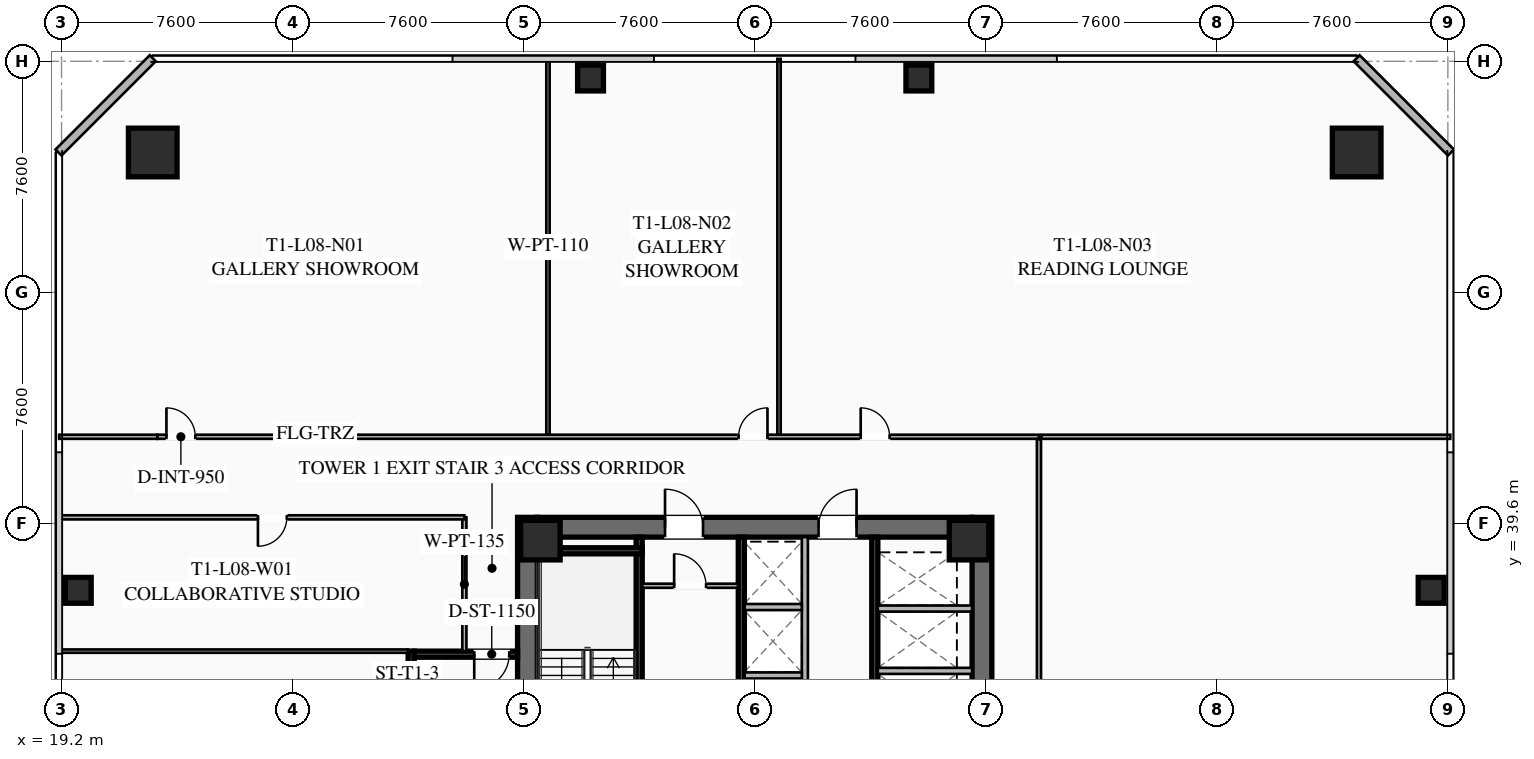
"""IFC4 building model, lengths in metres.
Left out: names, types, materials, properties, quantities, classifications, styles, units other than length and angle.
Written with IfcOpenShell. Run it as: python <this file> out.ifc"""

import sys

from ifc_helpers import new_model, si_unit, direction, frame, frame_2d, origin, origin_2d, place, context, subcontext, project, spatial, rectangle, hollow_rectangle, extrude, element, fill, save


model = new_model("IFC4")
c1 = context("Model", 3, precision=1e-05, world=origin(), true_north=direction((0.0, 1.0)))
c2 = subcontext(c1, "Body", "Model", "MODEL_VIEW")
j1 = project(units=[si_unit("LENGTHUNIT", "METRE"), si_unit("PLANEANGLEUNIT", "RADIAN")], contexts=[c1])
p1 = place(None, origin())
s1 = spatial("IfcSite", under=j1, at=p1, CompositionType="ELEMENT")
p2 = place(p1, origin())
s2 = spatial("IfcBuilding", under=s1, at=p2, CompositionType="ELEMENT")
p3 = place(p2, frame((0.0, 0.0, 35.25)))
s3 = spatial("IfcBuildingStorey", under=s2, at=p3, CompositionType="ELEMENT", Elevation=35.25)
for number, where, z_axis, x_axis in (
    (1, (34.525, 24.2, 0.0), (0.0, 0.0, 1.0), (0.0, 1.0, 0.0)),
    (2, (49.475, 39.8, 0.0), (0.0, 0.0, 1.0), (0.0, -1.0, 0.0)),
):
    element("IfcWall", number, at=place(p3, frame(where, z_axis=z_axis, x_axis=x_axis)), inside=s3, PredefinedType="SHEAR", context=c2, shape_type="SweptSolid", body=[
        extrude(rectangle(XDim=15.6, YDim=0.65, at=frame_2d((7.8, 0.0))), origin(), (0.0, 0.0, 1.0), 3.55),
    ])
p4 = place(p3, frame((34.85, 39.475, 0.0), z_axis=(0.0, 0.0, 1.0), x_axis=(1.0, 0.0, 0.0)))
e3 = element("IfcWall", 3, at=p4, inside=s3, PredefinedType="SHEAR", context=c2, shape_type="SweptSolid", body=[
    extrude(rectangle(XDim=14.3, YDim=0.65, at=frame_2d((7.15, 0.0))), origin(), (0.0, 0.0, 1.0), 3.55),
])
p5 = place(p4, frame((4.2, 0.0, 0.0)))
e4 = element("IfcOpeningElement", 4, at=p5, cuts=e3, PredefinedType="OPENING", context=c2, shape_type="SweptSolid", body=[
    extrude(rectangle(XDim=1.25, YDim=2.25, at=frame_2d((0.625, 1.125))), frame((0.0, 0.335, 0.0), z_axis=(0.0, -1.0, 0.0), x_axis=(1.0, 0.0, 0.0)), (0.0, 0.0, 1.0), 0.67),
])
p6 = place(p4, frame((9.25, 0.0, 0.0)))
e5 = element("IfcOpeningElement", 5, at=p6, cuts=e3, PredefinedType="OPENING", context=c2, shape_type="SweptSolid", body=[
    extrude(rectangle(XDim=1.25, YDim=2.25, at=frame_2d((0.625, 1.125))), frame((0.0, 0.335, 0.0), z_axis=(0.0, -1.0, 0.0), x_axis=(1.0, 0.0, 0.0)), (0.0, 0.0, 1.0), 0.67),
])
for number, where, z_axis, x_axis in (
    (6, (49.05, 39.05, 0.0), (0.0, 0.0, 1.0), (1.0, 0.0, 0.0)),
    (7, (34.95, 39.05, 0.0), (0.0, 0.0, 1.0), (1.0, 0.0, 0.0)),
):
    element("IfcColumn", number, at=place(p3, frame(where, z_axis=z_axis, x_axis=x_axis)), inside=s3, PredefinedType="COLUMN", context=c2, shape_type="SweptSolid", body=[
        extrude(hollow_rectangle(XDim=1.3, YDim=1.3, WallThickness=0.05, at=origin_2d()), origin(), (0.0, 0.0, 1.0), 3.35),
    ])
for number, where, z_axis, x_axis in (
    (8, (61.8, 51.8, 0.0), (0.0, 0.0, 1.0), (1.0, 0.0, 0.0)),
    (9, (22.2, 51.8, 0.0), (0.0, 0.0, 1.0), (1.0, 0.0, 0.0)),
):
    element("IfcColumn", number, at=place(p3, frame(where, z_axis=z_axis, x_axis=x_axis)), inside=s3, PredefinedType="COLUMN", context=c2, shape_type="SweptSolid", body=[
        extrude(hollow_rectangle(XDim=1.6, YDim=1.6, WallThickness=0.06, at=origin_2d()), origin(), (0.0, 0.0, 1.0), 3.35),
    ])
for number, where, z_axis, x_axis in (
    (10, (64.25, 37.4, 0.0), (0.0, 0.0, 1.0), (1.0, 0.0, 0.0)),
    (11, (47.4, 54.25, 0.0), (0.0, 0.0, 1.0), (1.0, 0.0, 0.0)),
    (12, (36.6, 54.25, 0.0), (0.0, 0.0, 1.0), (1.0, 0.0, 0.0)),
    (13, (19.75, 37.4, 0.0), (0.0, 0.0, 1.0), (1.0, 0.0, 0.0)),
):
    element("IfcColumn", number, at=place(p3, frame(where, z_axis=z_axis, x_axis=x_axis)), inside=s3, PredefinedType="COLUMN", context=c2, shape_type="SweptSolid", body=[
        extrude(hollow_rectangle(XDim=0.85, YDim=0.85, WallThickness=0.035, at=origin_2d()), origin(), (0.0, 0.0, 1.0), 3.35),
    ])
for number, where, z_axis, x_axis in (
    (14, (19.1, 51.8, 0.0), (0.0, 0.0, 1.0), (0.707, 0.707, 0.0)),
    (15, (61.8, 54.9, 0.0), (0.0, 0.0, 1.0), (0.707, -0.707, 0.0)),
):
    element("IfcWall", number, at=place(p3, frame(where, z_axis=z_axis, x_axis=x_axis)), inside=s3, PredefinedType="SOLIDWALL", context=c2, shape_type="SweptSolid", body=[
        extrude(rectangle(XDim=4.384, YDim=0.28, at=frame_2d((2.192, 0.0))), origin(), (0.0, 0.0, 1.0), 3.35),
    ])
p7 = place(p3, frame((38.2, 31.2, 0.0), z_axis=(0.0, 0.0, 1.0), x_axis=(0.0, 1.0, 0.0)))
e16 = element("IfcWall", 16, at=p7, inside=s3, PredefinedType="SHEAR", context=c2, shape_type="SweptSolid", body=[
    extrude(rectangle(XDim=7.95, YDim=0.2, at=frame_2d((3.975, 0.0))), origin(), (0.0, 0.0, 1.0), 3.35),
])
p8 = place(p7, frame((0.45, 0.0, 0.0)))
e17 = element("IfcOpeningElement", 17, at=p8, cuts=e16, PredefinedType="OPENING", context=c2, shape_type="SweptSolid", body=[
    extrude(rectangle(XDim=1.15, YDim=2.2, at=frame_2d((0.575, 1.1))), frame((0.0, 0.11, 0.0), z_axis=(0.0, -1.0, 0.0), x_axis=(1.0, 0.0, 0.0)), (0.0, 0.0, 1.0), 0.22),
])
p9 = place(p3, frame((34.85, 38.7, 0.0), z_axis=(0.0, 0.0, 1.0), x_axis=(1.0, 0.0, 0.0)))
e18 = element("IfcWall", 18, at=p9, inside=s3, PredefinedType="SHEAR", context=c2, shape_type="SweptSolid", body=[
    extrude(rectangle(XDim=3.45, YDim=0.2, at=frame_2d((1.725, 0.0))), origin(), (0.0, 0.0, 1.0), 3.35),
])
p10 = place(p3, frame((41.56, 24.85, 0.0), z_axis=(0.0, 0.0, 1.0), x_axis=(0.0, 1.0, 0.0)))
e19 = element("IfcWall", 19, at=p10, inside=s3, PredefinedType="SHEAR", context=c2, shape_type="SweptSolid", body=[
    extrude(rectangle(XDim=14.3, YDim=0.2, at=frame_2d((7.15, 0.0))), origin(), (0.0, 0.0, 1.0), 3.35),
])
p11 = place(p3, frame((45.95, 39.15, 0.0), z_axis=(0.0, 0.0, 1.0), x_axis=(0.0, -1.0, 0.0)))
e20 = element("IfcWall", 20, at=p11, inside=s3, PredefinedType="SHEAR", context=c2, shape_type="SweptSolid", body=[
    extrude(rectangle(XDim=6.35, YDim=0.2, at=frame_2d((3.175, 0.0))), origin(), (0.0, 0.0, 1.0), 3.35),
])
for number, where, z_axis, x_axis in (
    (21, (46.05, 34.75, 0.0), (0.0, 0.0, 1.0), (1.0, 0.0, 0.0)),
    (22, (46.05, 36.8, 0.0), (0.0, 0.0, 1.0), (1.0, 0.0, 0.0)),
):
    element("IfcWall", number, at=place(p3, frame(where, z_axis=z_axis, x_axis=x_axis)), inside=s3, PredefinedType="SOLIDWALL", context=c2, shape_type="SweptSolid", body=[
        extrude(rectangle(XDim=3.1, YDim=0.2, at=frame_2d((1.55, 0.0))), origin(), (0.0, 0.0, 1.0), 3.35),
    ])
p12 = place(p3, frame((38.3, 37.55, 0.0), z_axis=(0.0, 0.0, 1.0), x_axis=(1.0, 0.0, 0.0)))
e23 = element("IfcWall", 23, at=p12, inside=s3, PredefinedType="PARTITIONING", context=c2, shape_type="SweptSolid", body=[
    extrude(rectangle(XDim=3.15, YDim=0.135, at=frame_2d((1.575, 0.0))), origin(), (0.0, 0.0, 1.0), 2.703),
])
p13 = place(p12, frame((1.05, 0.0, 0.0)))
e24 = element("IfcOpeningElement", 24, at=p13, cuts=e23, PredefinedType="OPENING", context=c2, shape_type="SweptSolid", body=[
    extrude(rectangle(XDim=1.05, YDim=2.2, at=frame_2d((0.525, 1.1))), frame((0.0, 0.077, 0.0), z_axis=(0.0, -1.0, 0.0), x_axis=(1.0, 0.0, 0.0)), (0.0, 0.0, 1.0), 0.155),
])
p14 = place(p3, frame((43.65, 32.35, 0.0), z_axis=(0.0, 0.0, 1.0), x_axis=(0.0, 1.0, 0.0)))
e25 = element("IfcWall", 25, at=p14, inside=s3, PredefinedType="SOLIDWALL", context=c2, shape_type="SweptSolid", body=[
    extrude(rectangle(XDim=6.8, YDim=0.2, at=frame_2d((3.4, 0.0))), origin(), (0.0, 0.0, 1.0), 3.35),
])
for number, where, z_axis, x_axis in (
    (26, (41.67, 34.6, 0.0), (0.0, 0.0, 1.0), (1.0, 0.0, 0.0)),
    (27, (41.67, 36.85, 0.0), (0.0, 0.0, 1.0), (1.0, 0.0, 0.0)),
):
    element("IfcWall", number, at=place(p3, frame(where, z_axis=z_axis, x_axis=x_axis)), inside=s3, PredefinedType="SOLIDWALL", context=c2, shape_type="SweptSolid", body=[
        extrude(rectangle(XDim=1.88, YDim=0.2, at=frame_2d((0.94, 0.0))), origin(), (0.0, 0.0, 1.0), 3.35),
    ])
p15 = place(p3, frame((30.7, 28.6, 0.0), z_axis=(0.0, 0.0, 1.0), x_axis=(0.0, 1.0, 0.0)))
e28 = element("IfcWall", 28, at=p15, inside=s3, PredefinedType="SHEAR", context=c2, shape_type="SweptSolid", body=[
    extrude(rectangle(XDim=6.8, YDim=0.2, at=frame_2d((3.4, 0.0))), origin(), (0.0, 0.0, 1.0), 3.35),
])
p16 = place(p3, frame((34.2, 35.3, 0.0), z_axis=(0.0, 0.0, 1.0), x_axis=(-1.0, 0.0, 0.0)))
e29 = element("IfcWall", 29, at=p16, inside=s3, PredefinedType="SHEAR", context=c2, shape_type="SweptSolid", body=[
    extrude(rectangle(XDim=3.4, YDim=0.2, at=frame_2d((1.7, 0.0))), origin(), (0.0, 0.0, 1.0), 3.35),
])
p17 = place(p16, frame((0.275, 0.0, 0.0)))
e30 = element("IfcOpeningElement", 30, at=p17, cuts=e29, PredefinedType="OPENING", context=c2, shape_type="SweptSolid", body=[
    extrude(rectangle(XDim=1.15, YDim=2.2, at=frame_2d((0.575, 1.1))), frame((0.0, 0.11, 0.0), z_axis=(0.0, -1.0, 0.0), x_axis=(1.0, 0.0, 0.0)), (0.0, 0.0, 1.0), 0.22),
])
p18 = place(p3, frame((32.45, 35.4, 0.0), z_axis=(0.0, 0.0, 1.0), x_axis=(0.0, 1.0, 0.0)))
e31 = element("IfcWall", 31, at=p18, inside=s3, PredefinedType="PARTITIONING", context=c2, shape_type="SweptSolid", body=[
    extrude(rectangle(XDim=4.4, YDim=0.135, at=frame_2d((2.2, 0.0))), origin(), (0.0, 0.0, 1.0), 2.703),
])
p19 = place(p3, frame((22.35, 42.45, 0.0), z_axis=(0.0, 0.0, 1.0), x_axis=(1.0, 0.0, 0.0)))
e32 = element("IfcWall", 32, at=p19, inside=s3, PredefinedType="PARTITIONING", context=c2, shape_type="SweptSolid", body=[
    extrude(rectangle(XDim=29.0, YDim=0.135, at=frame_2d((14.5, 0.0))), origin(), (0.0, 0.0, 1.0), 2.703),
])
p20 = place(p19, frame((0.3, 0.0, 0.0)))
e33 = element("IfcOpeningElement", 33, at=p20, cuts=e32, PredefinedType="OPENING", context=c2, shape_type="SweptSolid", body=[
    extrude(rectangle(XDim=0.95, YDim=2.05, at=frame_2d((0.475, 1.025))), frame((0.0, 0.077, 0.0), z_axis=(0.0, -1.0, 0.0), x_axis=(1.0, 0.0, 0.0)), (0.0, 0.0, 1.0), 0.155),
])
p21 = place(p19, frame((19.12, 0.0, 0.0)))
e34 = element("IfcOpeningElement", 34, at=p21, cuts=e32, PredefinedType="OPENING", context=c2, shape_type="SweptSolid", body=[
    extrude(rectangle(XDim=0.95, YDim=2.05, at=frame_2d((0.475, 1.025))), frame((0.0, 0.077, 0.0), z_axis=(0.0, -1.0, 0.0), x_axis=(1.0, 0.0, 0.0)), (0.0, 0.0, 1.0), 0.155),
])
p22 = place(p19, frame((23.137, 0.0, 0.0)))
e35 = element("IfcOpeningElement", 35, at=p22, cuts=e32, PredefinedType="OPENING", context=c2, shape_type="SweptSolid", body=[
    extrude(rectangle(XDim=0.95, YDim=2.05, at=frame_2d((0.475, 1.025))), frame((0.0, 0.077, 0.0), z_axis=(0.0, -1.0, 0.0), x_axis=(1.0, 0.0, 0.0)), (0.0, 0.0, 1.0), 0.155),
])
p23 = place(p3, frame((19.12, 42.45, 0.0), z_axis=(0.0, 0.0, 1.0), x_axis=(1.0, 0.0, 0.0)))
e36 = element("IfcWall", 36, at=p23, inside=s3, PredefinedType="PARTITIONING", context=c2, shape_type="SweptSolid", body=[
    extrude(rectangle(XDim=3.23, YDim=0.135, at=frame_2d((1.615, 0.0))), origin(), (0.0, 0.0, 1.0), 2.703),
])
for number, where, z_axis, x_axis in (
    (37, (35.2, 42.53, 0.0), (0.0, 0.0, 1.0), (0.0, 1.0, 0.0)),
    (38, (42.8, 42.53, 0.0), (0.0, 0.0, 1.0), (0.0, 1.0, 0.0)),
):
    element("IfcWall", number, at=place(p3, frame(where, z_axis=z_axis, x_axis=x_axis)), inside=s3, PredefinedType="PARTITIONING", context=c2, shape_type="SweptSolid", body=[
        extrude(rectangle(XDim=12.35, YDim=0.11, at=frame_2d((6.175, 0.0))), origin(), (0.0, 0.0, 1.0), 2.703),
    ])
p24 = place(p3, frame((51.35, 42.37, 0.0), z_axis=(0.0, 0.0, 1.0), x_axis=(0.0, -1.0, 0.0)))
e39 = element("IfcWall", 39, at=p24, inside=s3, PredefinedType="PARTITIONING", context=c2, shape_type="SweptSolid", body=[
    extrude(rectangle(XDim=21.66, YDim=0.135, at=frame_2d((10.83, 0.0))), origin(), (0.0, 0.0, 1.0), 2.703),
])
p25 = place(p24, frame((20.41, 0.0, 0.0)))
e40 = element("IfcOpeningElement", 40, at=p25, cuts=e39, PredefinedType="OPENING", context=c2, shape_type="SweptSolid", body=[
    extrude(rectangle(XDim=0.95, YDim=2.05, at=frame_2d((0.475, 1.025))), frame((0.0, 0.077, 0.0), z_axis=(0.0, -1.0, 0.0), x_axis=(1.0, 0.0, 0.0)), (0.0, 0.0, 1.0), 0.155),
])
p26 = place(p3, frame((64.88, 42.45, 0.0), z_axis=(0.0, 0.0, 1.0), x_axis=(-1.0, 0.0, 0.0)))
e41 = element("IfcWall", 41, at=p26, inside=s3, PredefinedType="PARTITIONING", context=c2, shape_type="SweptSolid", body=[
    extrude(rectangle(XDim=13.45, YDim=0.135, at=frame_2d((6.725, 0.0))), origin(), (0.0, 0.0, 1.0), 2.703),
])
p27 = place(p3, frame((32.45, 39.8, 0.0), z_axis=(0.0, 0.0, 1.0), x_axis=(-1.0, 0.0, 0.0)))
e42 = element("IfcWall", 42, at=p27, inside=s3, PredefinedType="PARTITIONING", context=c2, shape_type="SweptSolid", body=[
    extrude(rectangle(XDim=13.33, YDim=0.135, at=frame_2d((6.665, 0.0))), origin(), (0.0, 0.0, 1.0), 2.703),
])
p28 = place(p27, frame((5.84, 0.0, 0.0)))
e43 = element("IfcOpeningElement", 43, at=p28, cuts=e42, PredefinedType="OPENING", context=c2, shape_type="SweptSolid", body=[
    extrude(rectangle(XDim=0.95, YDim=2.05, at=frame_2d((0.475, 1.025))), frame((0.0, 0.077, 0.0), z_axis=(0.0, -1.0, 0.0), x_axis=(1.0, 0.0, 0.0)), (0.0, 0.0, 1.0), 0.155),
])
p29 = place(p3, frame((30.6, 35.4, 0.0), z_axis=(0.0, 0.0, 1.0), x_axis=(-1.0, 0.0, 0.0)))
e44 = element("IfcWall", 44, at=p29, inside=s3, PredefinedType="PARTITIONING", context=c2, shape_type="SweptSolid", body=[
    extrude(rectangle(XDim=11.48, YDim=0.11, at=frame_2d((5.74, 0.0))), origin(), (0.0, 0.0, 1.0), 2.703),
])
p30 = place(p5, origin())
e45 = element("IfcDoor", 45, at=p30, inside=s3, OperationType="SINGLE_SWING_LEFT", PredefinedType="DOOR", context=c2, shape_type="SweptSolid", body=[
    extrude(rectangle(XDim=1.25, YDim=2.25, at=frame_2d((0.625, 1.125))), frame((0.0, 0.025, 0.0), z_axis=(0.0, -1.0, 0.0), x_axis=(1.0, 0.0, 0.0)), (0.0, 0.0, 1.0), 0.05),
])
fill(e4, e45)
p31 = place(p6, origin())
e46 = element("IfcDoor", 46, at=p31, inside=s3, OperationType="SINGLE_SWING_RIGHT", PredefinedType="DOOR", context=c2, shape_type="SweptSolid", body=[
    extrude(rectangle(XDim=1.25, YDim=2.25, at=frame_2d((0.625, 1.125))), frame((0.0, 0.025, 0.0), z_axis=(0.0, -1.0, 0.0), x_axis=(1.0, 0.0, 0.0)), (0.0, 0.0, 1.0), 0.05),
])
fill(e5, e46)
p32 = place(p13, origin())
e47 = element("IfcDoor", 47, at=p32, inside=s3, OperationType="SINGLE_SWING_LEFT", PredefinedType="DOOR", context=c2, shape_type="SweptSolid", body=[
    extrude(rectangle(XDim=1.05, YDim=2.2, at=frame_2d((0.525, 1.1))), frame((0.0, 0.025, 0.0), z_axis=(0.0, -1.0, 0.0), x_axis=(1.0, 0.0, 0.0)), (0.0, 0.0, 1.0), 0.05),
])
fill(e24, e47)
p33 = place(p17, origin())
e48 = element("IfcDoor", 48, at=p33, inside=s3, OperationType="SINGLE_SWING_RIGHT", PredefinedType="DOOR", context=c2, shape_type="SweptSolid", body=[
    extrude(rectangle(XDim=1.15, YDim=2.2, at=frame_2d((0.575, 1.1))), frame((0.0, 0.025, 0.0), z_axis=(0.0, -1.0, 0.0), x_axis=(1.0, 0.0, 0.0)), (0.0, 0.0, 1.0), 0.05),
])
fill(e30, e48)
p34 = place(p20, origin())
e49 = element("IfcDoor", 49, at=p34, inside=s3, OperationType="SINGLE_SWING_LEFT", PredefinedType="DOOR", context=c2, shape_type="SweptSolid", body=[
    extrude(rectangle(XDim=0.95, YDim=2.05, at=frame_2d((0.475, 1.025))), frame((0.0, 0.025, 0.0), z_axis=(0.0, -1.0, 0.0), x_axis=(1.0, 0.0, 0.0)), (0.0, 0.0, 1.0), 0.05),
])
fill(e33, e49)
p35 = place(p21, origin())
e50 = element("IfcDoor", 50, at=p35, inside=s3, OperationType="SINGLE_SWING_RIGHT", PredefinedType="DOOR", context=c2, shape_type="SweptSolid", body=[
    extrude(rectangle(XDim=0.95, YDim=2.05, at=frame_2d((0.475, 1.025))), frame((0.0, 0.025, 0.0), z_axis=(0.0, -1.0, 0.0), x_axis=(1.0, 0.0, 0.0)), (0.0, 0.0, 1.0), 0.05),
])
fill(e34, e50)
p36 = place(p22, origin())
e51 = element("IfcDoor", 51, at=p36, inside=s3, OperationType="SINGLE_SWING_LEFT", PredefinedType="DOOR", context=c2, shape_type="SweptSolid", body=[
    extrude(rectangle(XDim=0.95, YDim=2.05, at=frame_2d((0.475, 1.025))), frame((0.0, 0.025, 0.0), z_axis=(0.0, -1.0, 0.0), x_axis=(1.0, 0.0, 0.0)), (0.0, 0.0, 1.0), 0.05),
])
fill(e35, e51)
p37 = place(p28, origin())
e52 = element("IfcDoor", 52, at=p37, inside=s3, OperationType="SINGLE_SWING_RIGHT", PredefinedType="DOOR", context=c2, shape_type="SweptSolid", body=[
    extrude(rectangle(XDim=0.95, YDim=2.05, at=frame_2d((0.475, 1.025))), frame((0.0, 0.025, 0.0), z_axis=(0.0, -1.0, 0.0), x_axis=(1.0, 0.0, 0.0)), (0.0, 0.0, 1.0), 0.05),
])
fill(e43, e52)
save(model, sys.argv[1])
